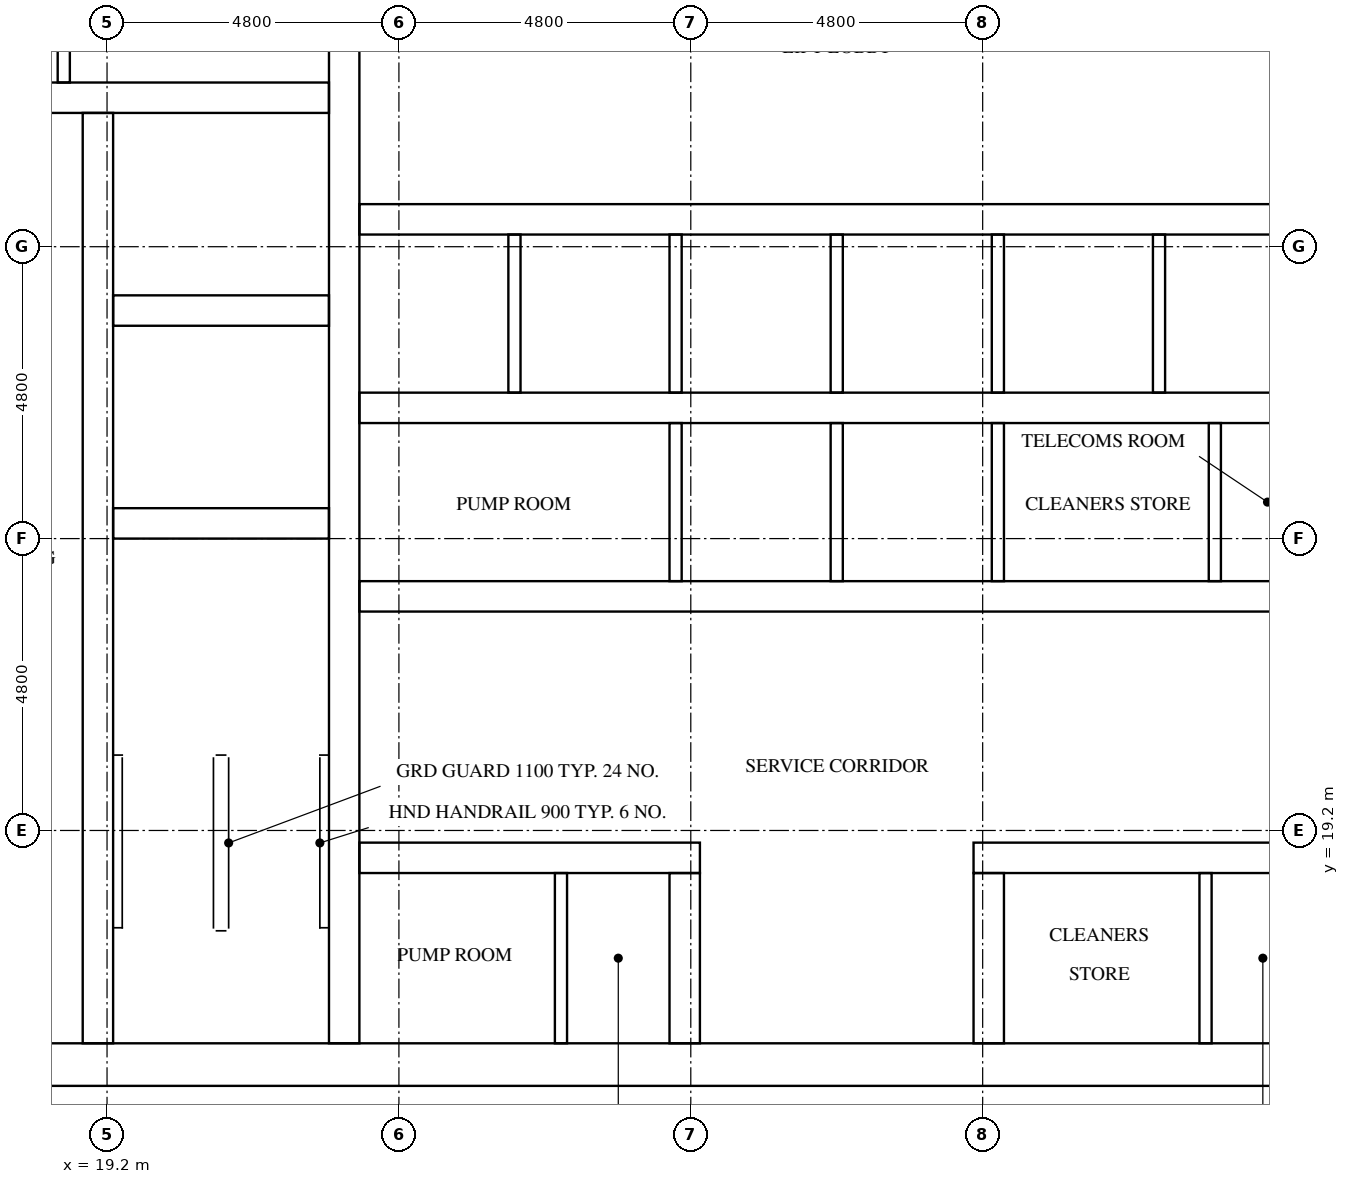
"""IFC4 building model, lengths in metres.
Left out: names, types, materials, properties, quantities, classifications, styles, units other than length and angle.
Written with IfcOpenShell. Run it as: python <this file> out.ifc"""

import sys

from ifc_helpers import new_model, si_unit, direction, frame, frame_2d, origin, place, context, subcontext, project, spatial, rectangle, extrude, element, fill, save


model = new_model("IFC4")
c1 = context("Model", 3, precision=1e-05, world=origin(), true_north=direction((0.0, 1.0)))
c2 = subcontext(c1, "Body", "Model", "MODEL_VIEW")
j1 = project(units=[si_unit("LENGTHUNIT", "METRE"), si_unit("PLANEANGLEUNIT", "RADIAN")], contexts=[c1])
p1 = place(None, origin())
s1 = spatial("IfcSite", under=j1, at=p1, CompositionType="ELEMENT")
p2 = place(p1, origin())
s2 = spatial("IfcBuilding", under=s1, at=p2, CompositionType="ELEMENT")
p3 = place(p2, frame((0.0, 0.0, 182.4)))
s3 = spatial("IfcBuildingStorey", under=s2, at=p3, CompositionType="ELEMENT", Elevation=182.4)
p4 = place(p3, frame((15.0, 15.35, 0.0), z_axis=(0.0, 0.0, 1.0), x_axis=(1.0, 0.0, 0.0)))
e1 = element("IfcWall", 1, at=p4, inside=s3, PredefinedType="SHEAR", context=c2, shape_type="SweptSolid", body=[
    extrude(rectangle(XDim=32.4, YDim=0.7, at=frame_2d((16.2, 0.0))), origin(), (0.0, 0.0, 1.0), 3.2),
])
p5 = place(p4, frame((15.3, 0.0, 0.0)))
e2 = element("IfcOpeningElement", 2, at=p5, cuts=e1, PredefinedType="OPENING", context=c2, shape_type="SweptSolid", body=[
    extrude(rectangle(XDim=1.8, YDim=2.1, at=frame_2d((0.9, 1.05))), frame((0.0, 0.36, 0.0), z_axis=(0.0, -1.0, 0.0), x_axis=(1.0, 0.0, 0.0)), (0.0, 0.0, 1.0), 0.72),
])
p6 = place(p3, frame((19.05, 15.7, 0.0), z_axis=(0.0, 0.0, 1.0), x_axis=(0.0, 1.0, 0.0)))
e3 = element("IfcWall", 3, at=p6, inside=s3, PredefinedType="SHEAR", context=c2, shape_type="SweptSolid", body=[
    extrude(rectangle(XDim=15.3, YDim=0.5, at=frame_2d((7.65, 0.0))), origin(), (0.0, 0.0, 1.0), 3.2),
])
p7 = place(p6, frame((9.75, 0.0, 0.0)))
e4 = element("IfcOpeningElement", 4, at=p7, cuts=e3, PredefinedType="OPENING", context=c2, shape_type="SweptSolid", body=[
    extrude(rectangle(XDim=1.1, YDim=2.1, at=frame_2d((0.55, 1.05))), frame((0.0, 0.26, 0.0), z_axis=(0.0, -1.0, 0.0), x_axis=(1.0, 0.0, 0.0)), (0.0, 0.0, 1.0), 0.52),
])
p8 = place(p6, frame((13.25, 0.0, 0.0)))
e5 = element("IfcOpeningElement", 5, at=p8, cuts=e3, PredefinedType="OPENING", context=c2, shape_type="SweptSolid", body=[
    extrude(rectangle(XDim=1.1, YDim=2.1, at=frame_2d((0.55, 1.05))), frame((0.0, 0.26, 0.0), z_axis=(0.0, -1.0, 0.0), x_axis=(1.0, 0.0, 0.0)), (0.0, 0.0, 1.0), 0.52),
])
p9 = place(p6, frame((0.5, 0.0, 0.0)))
e6 = element("IfcOpeningElement", 6, at=p9, cuts=e3, PredefinedType="OPENING", context=c2, shape_type="SweptSolid", body=[
    extrude(rectangle(XDim=1.2, YDim=2.1, at=frame_2d((0.6, 1.05))), frame((0.0, 0.26, 0.0), z_axis=(0.0, -1.0, 0.0), x_axis=(1.0, 0.0, 0.0)), (0.0, 0.0, 1.0), 0.52),
])
p10 = place(p3, frame((23.1, 15.7, 0.0), z_axis=(0.0, 0.0, 1.0), x_axis=(0.0, 1.0, 0.0)))
e7 = element("IfcWall", 7, at=p10, inside=s3, PredefinedType="SHEAR", context=c2, shape_type="SweptSolid", body=[
    extrude(rectangle(XDim=21.4, YDim=0.5, at=frame_2d((10.7, 0.0))), origin(), (0.0, 0.0, 1.0), 3.2),
])
for number, where, z_axis, x_axis in (
    (8, (19.3, 24.25, 0.0), (0.0, 0.0, 1.0), (1.0, 0.0, 0.0)),
    (9, (19.3, 27.75, 0.0), (0.0, 0.0, 1.0), (1.0, 0.0, 0.0)),
):
    element("IfcWall", number, at=place(p3, frame(where, z_axis=z_axis, x_axis=x_axis)), inside=s3, PredefinedType="SHEAR", context=c2, shape_type="SweptSolid", body=[
        extrude(rectangle(XDim=3.55, YDim=0.5, at=frame_2d((1.775, 0.0))), origin(), (0.0, 0.0, 1.0), 3.2),
    ])
p11 = place(p3, frame((15.7, 31.25, 0.0), z_axis=(0.0, 0.0, 1.0), x_axis=(1.0, 0.0, 0.0)))
e10 = element("IfcWall", 10, at=p11, inside=s3, PredefinedType="SHEAR", context=c2, shape_type="SweptSolid", body=[
    extrude(rectangle(XDim=7.15, YDim=0.5, at=frame_2d((3.575, 0.0))), origin(), (0.0, 0.0, 1.0), 3.2),
])
p12 = place(p3, frame((23.35, 18.75, 0.0), z_axis=(0.0, 0.0, 1.0), x_axis=(1.0, 0.0, 0.0)))
e11 = element("IfcWall", 11, at=p12, inside=s3, PredefinedType="SHEAR", context=c2, shape_type="SweptSolid", body=[
    extrude(rectangle(XDim=5.6, YDim=0.5, at=frame_2d((2.8, 0.0))), origin(), (0.0, 0.0, 1.0), 3.2),
])
p13 = place(p12, frame((1.107, 0.0, 0.0)))
e12 = element("IfcOpeningElement", 12, at=p13, cuts=e11, PredefinedType="OPENING", context=c2, shape_type="SweptSolid", body=[
    extrude(rectangle(XDim=1.0, YDim=2.1, at=frame_2d((0.5, 1.05))), frame((0.0, 0.26, 0.0), z_axis=(0.0, -1.0, 0.0), x_axis=(1.0, 0.0, 0.0)), (0.0, 0.0, 1.0), 0.52),
])
p14 = place(p12, frame((3.758, 0.0, 0.0)))
e13 = element("IfcOpeningElement", 13, at=p14, cuts=e11, PredefinedType="OPENING", context=c2, shape_type="SweptSolid", body=[
    extrude(rectangle(XDim=1.0, YDim=2.1, at=frame_2d((0.5, 1.05))), frame((0.0, 0.26, 0.0), z_axis=(0.0, -1.0, 0.0), x_axis=(1.0, 0.0, 0.0)), (0.0, 0.0, 1.0), 0.52),
])
p15 = place(p3, frame((33.45, 18.75, 0.0), z_axis=(0.0, 0.0, 1.0), x_axis=(1.0, 0.0, 0.0)))
e14 = element("IfcWall", 14, at=p15, inside=s3, PredefinedType="SHEAR", context=c2, shape_type="SweptSolid", body=[
    extrude(rectangle(XDim=5.6, YDim=0.5, at=frame_2d((2.8, 0.0))), origin(), (0.0, 0.0, 1.0), 3.2),
])
p16 = place(p15, frame((1.607, 0.0, 0.0)))
e15 = element("IfcOpeningElement", 15, at=p16, cuts=e14, PredefinedType="OPENING", context=c2, shape_type="SweptSolid", body=[
    extrude(rectangle(XDim=1.0, YDim=2.1, at=frame_2d((0.5, 1.05))), frame((0.0, 0.26, 0.0), z_axis=(0.0, -1.0, 0.0), x_axis=(1.0, 0.0, 0.0)), (0.0, 0.0, 1.0), 0.52),
])
p17 = place(p15, frame((4.258, 0.0, 0.0)))
e16 = element("IfcOpeningElement", 16, at=p17, cuts=e14, PredefinedType="OPENING", context=c2, shape_type="SweptSolid", body=[
    extrude(rectangle(XDim=1.0, YDim=2.1, at=frame_2d((0.5, 1.05))), frame((0.0, 0.26, 0.0), z_axis=(0.0, -1.0, 0.0), x_axis=(1.0, 0.0, 0.0)), (0.0, 0.0, 1.0), 0.52),
])
p18 = place(p3, frame((23.35, 23.05, 0.0), z_axis=(0.0, 0.0, 1.0), x_axis=(1.0, 0.0, 0.0)))
e17 = element("IfcWall", 17, at=p18, inside=s3, PredefinedType="SHEAR", context=c2, shape_type="SweptSolid", body=[
    extrude(rectangle(XDim=15.7, YDim=0.5, at=frame_2d((7.85, 0.0))), origin(), (0.0, 0.0, 1.0), 3.2),
])
p19 = place(p18, frame((2.05, 0.0, 0.0)))
e18 = element("IfcOpeningElement", 18, at=p19, cuts=e17, PredefinedType="OPENING", context=c2, shape_type="SweptSolid", body=[
    extrude(rectangle(XDim=1.0, YDim=2.1, at=frame_2d((0.5, 1.05))), frame((0.0, 0.26, 0.0), z_axis=(0.0, -1.0, 0.0), x_axis=(1.0, 0.0, 0.0)), (0.0, 0.0, 1.0), 0.52),
])
p20 = place(p18, frame((11.784, 0.0, 0.0)))
e19 = element("IfcOpeningElement", 19, at=p20, cuts=e17, PredefinedType="OPENING", context=c2, shape_type="SweptSolid", body=[
    extrude(rectangle(XDim=1.0, YDim=2.1, at=frame_2d((0.5, 1.05))), frame((0.0, 0.26, 0.0), z_axis=(0.0, -1.0, 0.0), x_axis=(1.0, 0.0, 0.0)), (0.0, 0.0, 1.0), 0.52),
])
p21 = place(p18, frame((14.434, 0.0, 0.0)))
e20 = element("IfcOpeningElement", 20, at=p21, cuts=e17, PredefinedType="OPENING", context=c2, shape_type="SweptSolid", body=[
    extrude(rectangle(XDim=1.0, YDim=2.1, at=frame_2d((0.5, 1.05))), frame((0.0, 0.26, 0.0), z_axis=(0.0, -1.0, 0.0), x_axis=(1.0, 0.0, 0.0)), (0.0, 0.0, 1.0), 0.52),
])
p22 = place(p3, frame((23.35, 26.15, 0.0), z_axis=(0.0, 0.0, 1.0), x_axis=(1.0, 0.0, 0.0)))
e21 = element("IfcWall", 21, at=p22, inside=s3, PredefinedType="SHEAR", context=c2, shape_type="SweptSolid", body=[
    extrude(rectangle(XDim=15.7, YDim=0.5, at=frame_2d((7.85, 0.0))), origin(), (0.0, 0.0, 1.0), 3.2),
])
p23 = place(p3, frame((23.35, 29.25, 0.0), z_axis=(0.0, 0.0, 1.0), x_axis=(1.0, 0.0, 0.0)))
e22 = element("IfcWall", 22, at=p23, inside=s3, PredefinedType="SHEAR", context=c2, shape_type="SweptSolid", body=[
    extrude(rectangle(XDim=15.7, YDim=0.5, at=frame_2d((7.85, 0.0))), origin(), (0.0, 0.0, 1.0), 3.2),
])
p24 = place(p23, frame((0.675, 0.0, 0.0)))
e23 = element("IfcOpeningElement", 23, at=p24, cuts=e22, PredefinedType="OPENING", context=c2, shape_type="SweptSolid", body=[
    extrude(rectangle(XDim=1.1, YDim=2.1, at=frame_2d((0.55, 1.05))), frame((0.0, 0.26, 0.0), z_axis=(0.0, -1.0, 0.0), x_axis=(1.0, 0.0, 0.0)), (0.0, 0.0, 1.0), 0.52),
])
p25 = place(p23, frame((3.325, 0.0, 0.0)))
e24 = element("IfcOpeningElement", 24, at=p25, cuts=e22, PredefinedType="OPENING", context=c2, shape_type="SweptSolid", body=[
    extrude(rectangle(XDim=1.1, YDim=2.1, at=frame_2d((0.55, 1.05))), frame((0.0, 0.26, 0.0), z_axis=(0.0, -1.0, 0.0), x_axis=(1.0, 0.0, 0.0)), (0.0, 0.0, 1.0), 0.52),
])
p26 = place(p23, frame((5.975, 0.0, 0.0)))
e25 = element("IfcOpeningElement", 25, at=p26, cuts=e22, PredefinedType="OPENING", context=c2, shape_type="SweptSolid", body=[
    extrude(rectangle(XDim=1.1, YDim=2.1, at=frame_2d((0.55, 1.05))), frame((0.0, 0.26, 0.0), z_axis=(0.0, -1.0, 0.0), x_axis=(1.0, 0.0, 0.0)), (0.0, 0.0, 1.0), 0.52),
])
p27 = place(p23, frame((8.625, 0.0, 0.0)))
e26 = element("IfcOpeningElement", 26, at=p27, cuts=e22, PredefinedType="OPENING", context=c2, shape_type="SweptSolid", body=[
    extrude(rectangle(XDim=1.1, YDim=2.1, at=frame_2d((0.55, 1.05))), frame((0.0, 0.26, 0.0), z_axis=(0.0, -1.0, 0.0), x_axis=(1.0, 0.0, 0.0)), (0.0, 0.0, 1.0), 0.52),
])
p28 = place(p23, frame((11.275, 0.0, 0.0)))
e27 = element("IfcOpeningElement", 27, at=p28, cuts=e22, PredefinedType="OPENING", context=c2, shape_type="SweptSolid", body=[
    extrude(rectangle(XDim=1.1, YDim=2.1, at=frame_2d((0.55, 1.05))), frame((0.0, 0.26, 0.0), z_axis=(0.0, -1.0, 0.0), x_axis=(1.0, 0.0, 0.0)), (0.0, 0.0, 1.0), 0.52),
])
p29 = place(p23, frame((13.925, 0.0, 0.0)))
e28 = element("IfcOpeningElement", 28, at=p29, cuts=e22, PredefinedType="OPENING", context=c2, shape_type="SweptSolid", body=[
    extrude(rectangle(XDim=1.1, YDim=2.1, at=frame_2d((0.55, 1.05))), frame((0.0, 0.26, 0.0), z_axis=(0.0, -1.0, 0.0), x_axis=(1.0, 0.0, 0.0)), (0.0, 0.0, 1.0), 0.52),
])
for number, where, z_axis, x_axis in (
    (29, (28.7, 15.7, 0.0), (0.0, 0.0, 1.0), (0.0, 1.0, 0.0)),
    (30, (33.7, 15.7, 0.0), (0.0, 0.0, 1.0), (0.0, 1.0, 0.0)),
):
    element("IfcWall", number, at=place(p3, frame(where, z_axis=z_axis, x_axis=x_axis)), inside=s3, PredefinedType="SHEAR", context=c2, shape_type="SweptSolid", body=[
        extrude(rectangle(XDim=2.8, YDim=0.5, at=frame_2d((1.4, 0.0))), origin(), (0.0, 0.0, 1.0), 3.2),
    ])
p30 = place(p3, frame((25.9, 26.4, 0.0), z_axis=(0.0, 0.0, 1.0), x_axis=(0.0, 1.0, 0.0)))
e31 = element("IfcWall", 31, at=p30, inside=s3, PredefinedType="SOLIDWALL", context=c2, shape_type="SweptSolid", body=[
    extrude(rectangle(XDim=2.6, YDim=0.2, at=frame_2d((1.3, 0.0))), origin(), (0.0, 0.0, 1.0), 3.2),
])
p31 = place(p3, frame((28.55, 23.3, 0.0), z_axis=(0.0, 0.0, 1.0), x_axis=(0.0, 1.0, 0.0)))
e32 = element("IfcWall", 32, at=p31, inside=s3, PredefinedType="SOLIDWALL", context=c2, shape_type="SweptSolid", body=[
    extrude(rectangle(XDim=2.6, YDim=0.2, at=frame_2d((1.3, 0.0))), origin(), (0.0, 0.0, 1.0), 3.2),
])
p32 = place(p3, frame((28.55, 26.4, 0.0), z_axis=(0.0, 0.0, 1.0), x_axis=(0.0, 1.0, 0.0)))
e33 = element("IfcWall", 33, at=p32, inside=s3, PredefinedType="SOLIDWALL", context=c2, shape_type="SweptSolid", body=[
    extrude(rectangle(XDim=2.6, YDim=0.2, at=frame_2d((1.3, 0.0))), origin(), (0.0, 0.0, 1.0), 3.2),
])
p33 = place(p3, frame((31.2, 23.3, 0.0), z_axis=(0.0, 0.0, 1.0), x_axis=(0.0, 1.0, 0.0)))
e34 = element("IfcWall", 34, at=p33, inside=s3, PredefinedType="SOLIDWALL", context=c2, shape_type="SweptSolid", body=[
    extrude(rectangle(XDim=2.6, YDim=0.2, at=frame_2d((1.3, 0.0))), origin(), (0.0, 0.0, 1.0), 3.2),
])
p34 = place(p3, frame((31.2, 26.4, 0.0), z_axis=(0.0, 0.0, 1.0), x_axis=(0.0, 1.0, 0.0)))
e35 = element("IfcWall", 35, at=p34, inside=s3, PredefinedType="SOLIDWALL", context=c2, shape_type="SweptSolid", body=[
    extrude(rectangle(XDim=2.6, YDim=0.2, at=frame_2d((1.3, 0.0))), origin(), (0.0, 0.0, 1.0), 3.2),
])
p35 = place(p3, frame((33.85, 23.3, 0.0), z_axis=(0.0, 0.0, 1.0), x_axis=(0.0, 1.0, 0.0)))
e36 = element("IfcWall", 36, at=p35, inside=s3, PredefinedType="SOLIDWALL", context=c2, shape_type="SweptSolid", body=[
    extrude(rectangle(XDim=2.6, YDim=0.2, at=frame_2d((1.3, 0.0))), origin(), (0.0, 0.0, 1.0), 3.2),
])
for number, where, z_axis, x_axis in (
    (37, (33.85, 26.4, 0.0), (0.0, 0.0, 1.0), (0.0, 1.0, 0.0)),
    (38, (36.5, 26.4, 0.0), (0.0, 0.0, 1.0), (0.0, 1.0, 0.0)),
):
    element("IfcWall", number, at=place(p3, frame(where, z_axis=z_axis, x_axis=x_axis)), inside=s3, PredefinedType="SOLIDWALL", context=c2, shape_type="SweptSolid", body=[
        extrude(rectangle(XDim=2.6, YDim=0.2, at=frame_2d((1.3, 0.0))), origin(), (0.0, 0.0, 1.0), 3.2),
    ])
p36 = place(p3, frame((18.489, 31.5, 0.0), z_axis=(0.0, 0.0, 1.0), x_axis=(0.0, 1.0, 0.0)))
e39 = element("IfcWall", 39, at=p36, inside=s3, PredefinedType="PARTITIONING", context=c2, shape_type="SweptSolid", body=[
    extrude(rectangle(XDim=5.6, YDim=0.2, at=frame_2d((2.8, 0.0))), origin(), (0.0, 0.0, 1.0), 3.2),
])
p37 = place(p3, frame((37.418, 23.3, 0.0), z_axis=(0.0, 0.0, 1.0), x_axis=(0.0, 1.0, 0.0)))
e40 = element("IfcWall", 40, at=p37, inside=s3, PredefinedType="PARTITIONING", context=c2, shape_type="SweptSolid", body=[
    extrude(rectangle(XDim=2.6, YDim=0.2, at=frame_2d((1.3, 0.0))), origin(), (0.0, 0.0, 1.0), 3.2),
])
for number, where, z_axis, x_axis in (
    (41, (26.665, 15.7, 0.0), (0.0, 0.0, 1.0), (0.0, 1.0, 0.0)),
    (42, (37.265, 15.7, 0.0), (0.0, 0.0, 1.0), (0.0, 1.0, 0.0)),
):
    element("IfcWall", number, at=place(p3, frame(where, z_axis=z_axis, x_axis=x_axis)), inside=s3, PredefinedType="PARTITIONING", context=c2, shape_type="SweptSolid", body=[
        extrude(rectangle(XDim=2.8, YDim=0.2, at=frame_2d((1.4, 0.0))), origin(), (0.0, 0.0, 1.0), 3.2),
    ])
p38 = place(p24, origin())
e43 = element("IfcDoor", 43, at=p38, inside=s3, OperationType="DOUBLE_DOOR_SLIDING", PredefinedType="DOOR", context=c2, shape_type="SweptSolid", body=[
    extrude(rectangle(XDim=1.1, YDim=2.1, at=frame_2d((0.55, 1.05))), frame((0.0, 0.025, 0.0), z_axis=(0.0, -1.0, 0.0), x_axis=(1.0, 0.0, 0.0)), (0.0, 0.0, 1.0), 0.05),
])
fill(e23, e43)
p39 = place(p25, origin())
e44 = element("IfcDoor", 44, at=p39, inside=s3, OperationType="DOUBLE_DOOR_SLIDING", PredefinedType="DOOR", context=c2, shape_type="SweptSolid", body=[
    extrude(rectangle(XDim=1.1, YDim=2.1, at=frame_2d((0.55, 1.05))), frame((0.0, 0.025, 0.0), z_axis=(0.0, -1.0, 0.0), x_axis=(1.0, 0.0, 0.0)), (0.0, 0.0, 1.0), 0.05),
])
fill(e24, e44)
p40 = place(p26, origin())
e45 = element("IfcDoor", 45, at=p40, inside=s3, OperationType="DOUBLE_DOOR_SLIDING", PredefinedType="DOOR", context=c2, shape_type="SweptSolid", body=[
    extrude(rectangle(XDim=1.1, YDim=2.1, at=frame_2d((0.55, 1.05))), frame((0.0, 0.025, 0.0), z_axis=(0.0, -1.0, 0.0), x_axis=(1.0, 0.0, 0.0)), (0.0, 0.0, 1.0), 0.05),
])
fill(e25, e45)
p41 = place(p27, origin())
e46 = element("IfcDoor", 46, at=p41, inside=s3, OperationType="DOUBLE_DOOR_SLIDING", PredefinedType="DOOR", context=c2, shape_type="SweptSolid", body=[
    extrude(rectangle(XDim=1.1, YDim=2.1, at=frame_2d((0.55, 1.05))), frame((0.0, 0.025, 0.0), z_axis=(0.0, -1.0, 0.0), x_axis=(1.0, 0.0, 0.0)), (0.0, 0.0, 1.0), 0.05),
])
fill(e26, e46)
p42 = place(p28, origin())
e47 = element("IfcDoor", 47, at=p42, inside=s3, OperationType="DOUBLE_DOOR_SLIDING", PredefinedType="DOOR", context=c2, shape_type="SweptSolid", body=[
    extrude(rectangle(XDim=1.1, YDim=2.1, at=frame_2d((0.55, 1.05))), frame((0.0, 0.025, 0.0), z_axis=(0.0, -1.0, 0.0), x_axis=(1.0, 0.0, 0.0)), (0.0, 0.0, 1.0), 0.05),
])
fill(e27, e47)
p43 = place(p29, origin())
e48 = element("IfcDoor", 48, at=p43, inside=s3, OperationType="DOUBLE_DOOR_SLIDING", PredefinedType="DOOR", context=c2, shape_type="SweptSolid", body=[
    extrude(rectangle(XDim=1.1, YDim=2.1, at=frame_2d((0.55, 1.05))), frame((0.0, 0.025, 0.0), z_axis=(0.0, -1.0, 0.0), x_axis=(1.0, 0.0, 0.0)), (0.0, 0.0, 1.0), 0.05),
])
fill(e28, e48)
p44 = place(p7, origin())
e49 = element("IfcDoor", 49, at=p44, inside=s3, OperationType="DOUBLE_DOOR_SLIDING", PredefinedType="DOOR", context=c2, shape_type="SweptSolid", body=[
    extrude(rectangle(XDim=1.1, YDim=2.1, at=frame_2d((0.55, 1.05))), frame((0.0, 0.025, 0.0), z_axis=(0.0, -1.0, 0.0), x_axis=(1.0, 0.0, 0.0)), (0.0, 0.0, 1.0), 0.05),
])
fill(e4, e49)
p45 = place(p8, origin())
e50 = element("IfcDoor", 50, at=p45, inside=s3, OperationType="DOUBLE_DOOR_SLIDING", PredefinedType="DOOR", context=c2, shape_type="SweptSolid", body=[
    extrude(rectangle(XDim=1.1, YDim=2.1, at=frame_2d((0.55, 1.05))), frame((0.0, 0.025, 0.0), z_axis=(0.0, -1.0, 0.0), x_axis=(1.0, 0.0, 0.0)), (0.0, 0.0, 1.0), 0.05),
])
fill(e5, e50)
p46 = place(p9, frame((1.2, 0.0, 0.0), z_axis=(0.0, 0.0, 1.0), x_axis=(-1.0, 0.0, 0.0)))
e51 = element("IfcDoor", 51, at=p46, inside=s3, OperationType="SINGLE_SWING_LEFT", PredefinedType="DOOR", context=c2, shape_type="SweptSolid", body=[
    extrude(rectangle(XDim=1.2, YDim=2.1, at=frame_2d((0.6, 1.05))), frame((0.0, 0.025, 0.0), z_axis=(0.0, -1.0, 0.0), x_axis=(1.0, 0.0, 0.0)), (0.0, 0.0, 1.0), 0.05),
])
fill(e6, e51)
p47 = place(p5, frame((1.8, 0.0, 0.0), z_axis=(0.0, 0.0, 1.0), x_axis=(-1.0, 0.0, 0.0)))
e52 = element("IfcDoor", 52, at=p47, inside=s3, OperationType="DOUBLE_DOOR_SINGLE_SWING", PredefinedType="DOOR", context=c2, shape_type="SweptSolid", body=[
    extrude(rectangle(XDim=1.8, YDim=2.1, at=frame_2d((0.9, 1.05))), frame((0.0, 0.025, 0.0), z_axis=(0.0, -1.0, 0.0), x_axis=(1.0, 0.0, 0.0)), (0.0, 0.0, 1.0), 0.05),
])
fill(e2, e52)
p48 = place(p19, frame((1.0, 0.0, 0.0), z_axis=(0.0, 0.0, 1.0), x_axis=(-1.0, 0.0, 0.0)))
e53 = element("IfcDoor", 53, at=p48, inside=s3, OperationType="SINGLE_SWING_RIGHT", PredefinedType="DOOR", context=c2, shape_type="SweptSolid", body=[
    extrude(rectangle(XDim=1.0, YDim=2.1, at=frame_2d((0.5, 1.05))), frame((0.0, 0.025, 0.0), z_axis=(0.0, -1.0, 0.0), x_axis=(1.0, 0.0, 0.0)), (0.0, 0.0, 1.0), 0.05),
])
fill(e18, e53)
p49 = place(p20, frame((1.0, 0.0, 0.0), z_axis=(0.0, 0.0, 1.0), x_axis=(-1.0, 0.0, 0.0)))
e54 = element("IfcDoor", 54, at=p49, inside=s3, OperationType="SINGLE_SWING_LEFT", PredefinedType="DOOR", context=c2, shape_type="SweptSolid", body=[
    extrude(rectangle(XDim=1.0, YDim=2.1, at=frame_2d((0.5, 1.05))), frame((0.0, 0.025, 0.0), z_axis=(0.0, -1.0, 0.0), x_axis=(1.0, 0.0, 0.0)), (0.0, 0.0, 1.0), 0.05),
])
fill(e19, e54)
p50 = place(p21, frame((1.0, 0.0, 0.0), z_axis=(0.0, 0.0, 1.0), x_axis=(-1.0, 0.0, 0.0)))
e55 = element("IfcDoor", 55, at=p50, inside=s3, OperationType="SINGLE_SWING_RIGHT", PredefinedType="DOOR", context=c2, shape_type="SweptSolid", body=[
    extrude(rectangle(XDim=1.0, YDim=2.1, at=frame_2d((0.5, 1.05))), frame((0.0, 0.025, 0.0), z_axis=(0.0, -1.0, 0.0), x_axis=(1.0, 0.0, 0.0)), (0.0, 0.0, 1.0), 0.05),
])
fill(e20, e55)
p51 = place(p13, origin())
e56 = element("IfcDoor", 56, at=p51, inside=s3, OperationType="SINGLE_SWING_LEFT", PredefinedType="DOOR", context=c2, shape_type="SweptSolid", body=[
    extrude(rectangle(XDim=1.0, YDim=2.1, at=frame_2d((0.5, 1.05))), frame((0.0, 0.025, 0.0), z_axis=(0.0, -1.0, 0.0), x_axis=(1.0, 0.0, 0.0)), (0.0, 0.0, 1.0), 0.05),
])
fill(e12, e56)
p52 = place(p14, origin())
e57 = element("IfcDoor", 57, at=p52, inside=s3, OperationType="SINGLE_SWING_RIGHT", PredefinedType="DOOR", context=c2, shape_type="SweptSolid", body=[
    extrude(rectangle(XDim=1.0, YDim=2.1, at=frame_2d((0.5, 1.05))), frame((0.0, 0.025, 0.0), z_axis=(0.0, -1.0, 0.0), x_axis=(1.0, 0.0, 0.0)), (0.0, 0.0, 1.0), 0.05),
])
fill(e13, e57)
p53 = place(p16, origin())
e58 = element("IfcDoor", 58, at=p53, inside=s3, OperationType="SINGLE_SWING_LEFT", PredefinedType="DOOR", context=c2, shape_type="SweptSolid", body=[
    extrude(rectangle(XDim=1.0, YDim=2.1, at=frame_2d((0.5, 1.05))), frame((0.0, 0.025, 0.0), z_axis=(0.0, -1.0, 0.0), x_axis=(1.0, 0.0, 0.0)), (0.0, 0.0, 1.0), 0.05),
])
fill(e15, e58)
p54 = place(p17, origin())
e59 = element("IfcDoor", 59, at=p54, inside=s3, OperationType="SINGLE_SWING_RIGHT", PredefinedType="DOOR", context=c2, shape_type="SweptSolid", body=[
    extrude(rectangle(XDim=1.0, YDim=2.1, at=frame_2d((0.5, 1.05))), frame((0.0, 0.025, 0.0), z_axis=(0.0, -1.0, 0.0), x_axis=(1.0, 0.0, 0.0)), (0.0, 0.0, 1.0), 0.05),
])
fill(e16, e59)
save(model, sys.argv[1])
